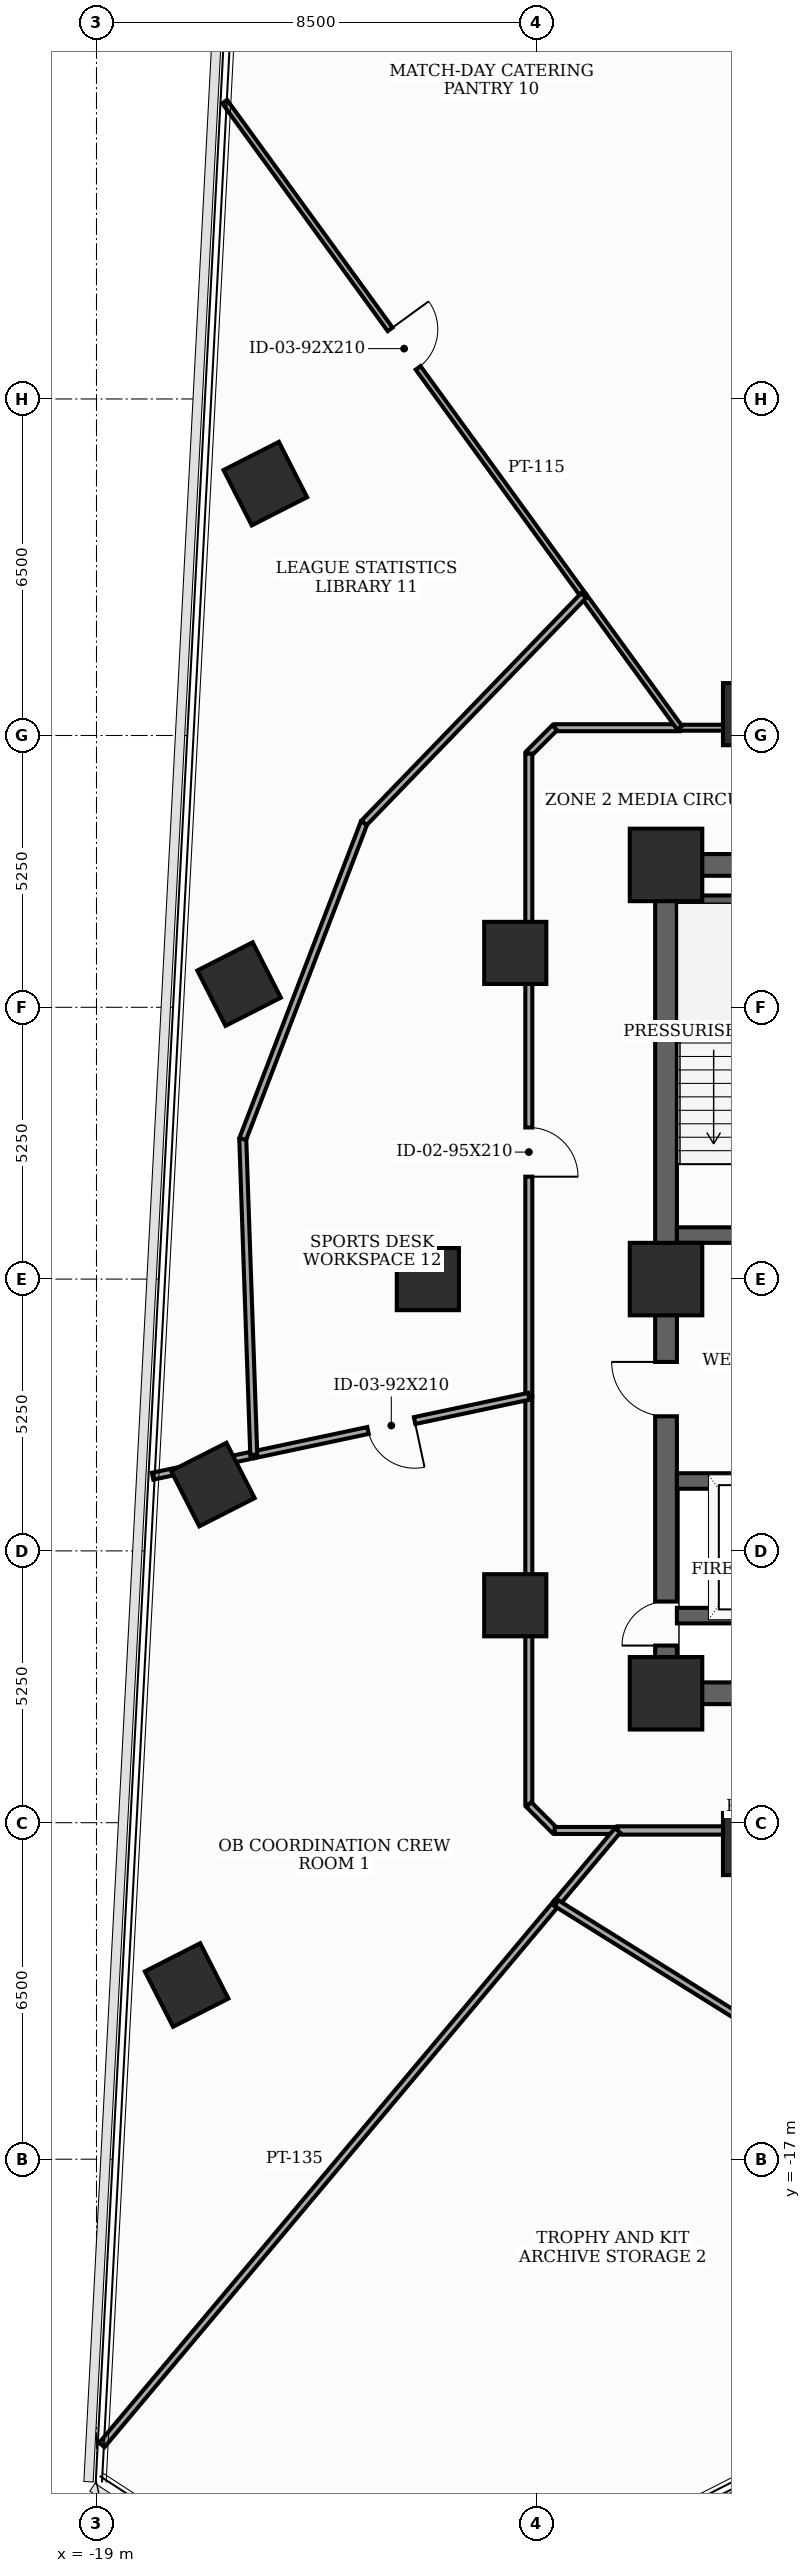
"""IFC4 building model, lengths in metres.
Left out: names, types, materials, properties, quantities, classifications, styles, units other than length and angle.
Written with IfcOpenShell. Run it as: python <this file> out.ifc"""

import sys

from ifc_helpers import new_model, si_unit, direction, frame, frame_2d, origin, origin_2d, place, context, subcontext, project, spatial, rectangle, extrude, element, fill, save


model = new_model("IFC4")
c1 = context("Model", 3, precision=1e-05, world=origin(), true_north=direction((0.0, 1.0)))
c2 = subcontext(c1, "Body", "Model", "MODEL_VIEW")
j1 = project(units=[si_unit("LENGTHUNIT", "METRE"), si_unit("PLANEANGLEUNIT", "RADIAN")], contexts=[c1])
p1 = place(None, origin())
s1 = spatial("IfcSite", under=j1, at=p1, CompositionType="ELEMENT")
p2 = place(p1, origin())
s2 = spatial("IfcBuilding", under=s1, at=p2, CompositionType="ELEMENT")
p3 = place(p2, frame((0.0, 0.0, 119.9)))
s3 = spatial("IfcBuildingStorey", under=s2, at=p3, CompositionType="ELEMENT", Elevation=119.9)
for number, where, z_axis, x_axis in (
    (1, (-8.0, -8.0, 0.0), (0.0, 0.0, 1.0), (1.0, 0.0, 0.0)),
    (2, (-8.0, 8.0, 0.0), (0.0, 0.0, 1.0), (1.0, 0.0, 0.0)),
    (3, (-8.0, 0.0, 0.0), (0.0, 0.0, 1.0), (1.0, 0.0, 0.0)),
):
    element("IfcColumn", number, at=place(p3, frame(where, z_axis=z_axis, x_axis=x_axis)), inside=s3, PredefinedType="COLUMN", context=c2, shape_type="SweptSolid", body=[
        extrude(rectangle(XDim=1.4, YDim=1.4, at=origin_2d()), origin(), (0.0, 0.0, 1.0), 3.7),
    ])
for number, where, z_axis, x_axis in (
    (4, (-6.3, 10.912, 0.0), (0.0, 0.0, 1.0), (1.0, 0.0, 0.0)),
    (5, (-10.912, 6.3, 0.0), (0.0, 0.0, 1.0), (1.0, 0.0, 0.0)),
    (6, (-12.6, 0.0, 0.0), (0.0, 0.0, 1.0), (1.0, 0.0, 0.0)),
    (7, (-10.912, -6.3, 0.0), (0.0, 0.0, 1.0), (1.0, 0.0, 0.0)),
    (8, (-6.3, -10.912, 0.0), (0.0, 0.0, 1.0), (1.0, 0.0, 0.0)),
    (9, (-15.739, 15.365, 0.0), (0.0, 0.0, 1.0), (0.891, 0.454, 0.0)),
    (10, (-16.246, 5.698, 0.0), (0.0, 0.0, 1.0), (0.891, 0.454, 0.0)),
    (11, (-16.752, -3.969, 0.0), (0.0, 0.0, 1.0), (0.891, 0.454, 0.0)),
    (12, (-17.259, -13.635, 0.0), (0.0, 0.0, 1.0), (0.891, 0.454, 0.0)),
):
    element("IfcColumn", number, at=place(p3, frame(where, z_axis=z_axis, x_axis=x_axis)), inside=s3, PredefinedType="COLUMN", context=c2, shape_type="SweptSolid", body=[
        extrude(rectangle(XDim=1.2, YDim=1.2, at=origin_2d()), origin(), (0.0, 0.0, 1.0), 3.7),
    ])
p4 = place(p3, frame((-8.0, -8.0, 0.0), z_axis=(0.0, 0.0, 1.0), x_axis=(0.0, 1.0, 0.0)))
e13 = element("IfcWall", 13, at=p4, inside=s3, PredefinedType="SHEAR", context=c2, shape_type="SweptSolid", body=[
    extrude(rectangle(XDim=16.0, YDim=0.42, at=frame_2d((8.0, 0.0))), origin(), (0.0, 0.0, 1.0), 3.5),
])
p5 = place(p4, frame((0.922, 0.0, 0.0)))
e14 = element("IfcOpeningElement", 14, at=p5, cuts=e13, PredefinedType="OPENING", context=c2, shape_type="SweptSolid", body=[
    extrude(rectangle(XDim=0.85, YDim=2.02, at=frame_2d((0.425, 1.01))), frame((0.0, 0.22, 0.0), z_axis=(0.0, -1.0, 0.0), x_axis=(1.0, 0.0, 0.0)), (0.0, 0.0, 1.0), 0.44),
])
p6 = place(p4, frame((5.35, 0.0, 0.0)))
e15 = element("IfcOpeningElement", 15, at=p6, cuts=e13, PredefinedType="OPENING", context=c2, shape_type="SweptSolid", body=[
    extrude(rectangle(XDim=1.05, YDim=2.15, at=frame_2d((0.525, 1.075))), frame((0.0, 0.22, 0.0), z_axis=(0.0, -1.0, 0.0), x_axis=(1.0, 0.0, 0.0)), (0.0, 0.0, 1.0), 0.44),
])
p7 = place(p3, frame((-8.0, -8.0, 0.0), z_axis=(0.0, 0.0, 1.0), x_axis=(1.0, 0.0, 0.0)))
e16 = element("IfcWall", 16, at=p7, inside=s3, PredefinedType="SHEAR", context=c2, shape_type="SweptSolid", body=[
    extrude(rectangle(XDim=16.0, YDim=0.42, at=frame_2d((8.0, 0.0))), origin(), (0.0, 0.0, 1.0), 3.5),
])
p8 = place(p7, frame((7.52, 0.0, 0.0)))
e17 = element("IfcOpeningElement", 17, at=p8, cuts=e16, PredefinedType="OPENING", context=c2, shape_type="SweptSolid", body=[
    extrude(rectangle(XDim=0.95, YDim=2.1, at=frame_2d((0.475, 1.05))), frame((0.0, 0.22, 0.0), z_axis=(0.0, -1.0, 0.0), x_axis=(1.0, 0.0, 0.0)), (0.0, 0.0, 1.0), 0.44),
])
p9 = place(p3, frame((-8.0, 8.0, 0.0), z_axis=(0.0, 0.0, 1.0), x_axis=(1.0, 0.0, 0.0)))
e18 = element("IfcWall", 18, at=p9, inside=s3, PredefinedType="SHEAR", context=c2, shape_type="SweptSolid", body=[
    extrude(rectangle(XDim=16.0, YDim=0.42, at=frame_2d((8.0, 0.0))), origin(), (0.0, 0.0, 1.0), 3.5),
])
p10 = place(p9, frame((7.1, 0.0, 0.0)))
e19 = element("IfcOpeningElement", 19, at=p10, cuts=e18, PredefinedType="OPENING", context=c2, shape_type="SweptSolid", body=[
    extrude(rectangle(XDim=1.8, YDim=2.15, at=frame_2d((0.9, 1.075))), frame((0.0, 0.22, 0.0), z_axis=(0.0, -1.0, 0.0), x_axis=(1.0, 0.0, 0.0)), (0.0, 0.0, 1.0), 0.44),
])
p11 = place(p3, frame((-7.79, 0.85, 0.0), z_axis=(0.0, 0.0, 1.0), x_axis=(1.0, 0.0, 0.0)))
e20 = element("IfcWall", 20, at=p11, inside=s3, PredefinedType="SHEAR", context=c2, shape_type="SweptSolid", body=[
    extrude(rectangle(XDim=3.34, YDim=0.3, at=frame_2d((1.67, 0.0))), origin(), (0.0, 0.0, 1.0), 3.5),
])
p12 = place(p11, frame((1.85, 0.0, 0.0)))
e21 = element("IfcOpeningElement", 21, at=p12, cuts=e20, PredefinedType="OPENING", context=c2, shape_type="SweptSolid", body=[
    extrude(rectangle(XDim=1.05, YDim=2.15, at=frame_2d((0.525, 1.075))), frame((0.0, 0.16, 0.0), z_axis=(0.0, -1.0, 0.0), x_axis=(1.0, 0.0, 0.0)), (0.0, 0.0, 1.0), 0.32),
])
p13 = place(p3, frame((-7.79, 7.26, 0.0), z_axis=(0.0, 0.0, 1.0), x_axis=(1.0, 0.0, 0.0)))
e22 = element("IfcWall", 22, at=p13, inside=s3, PredefinedType="SHEAR", context=c2, shape_type="SweptSolid", body=[
    extrude(rectangle(XDim=3.34, YDim=0.3, at=frame_2d((1.67, 0.0))), origin(), (0.0, 0.0, 1.0), 3.5),
])
p14 = place(p3, frame((-7.79, -3.9, 0.0), z_axis=(0.0, 0.0, 1.0), x_axis=(1.0, 0.0, 0.0)))
e23 = element("IfcWall", 23, at=p14, inside=s3, PredefinedType="SHEAR", context=c2, shape_type="SweptSolid", body=[
    extrude(rectangle(XDim=3.34, YDim=0.3, at=frame_2d((1.67, 0.0))), origin(), (0.0, 0.0, 1.0), 3.5),
])
p15 = place(p14, frame((1.27, 0.0, 0.0)))
e24 = element("IfcOpeningElement", 24, at=p15, cuts=e23, PredefinedType="OPENING", context=c2, shape_type="SweptSolid", body=[
    extrude(rectangle(XDim=1.1, YDim=2.1, at=frame_2d((0.55, 1.05))), frame((0.0, 0.16, 0.0), z_axis=(0.0, -1.0, 0.0), x_axis=(1.0, 0.0, 0.0)), (0.0, 0.0, 1.0), 0.32),
])
p16 = place(p3, frame((-7.79, -6.5, 0.0), z_axis=(0.0, 0.0, 1.0), x_axis=(1.0, 0.0, 0.0)))
e25 = element("IfcWall", 25, at=p16, inside=s3, PredefinedType="SHEAR", context=c2, shape_type="SweptSolid", body=[
    extrude(rectangle(XDim=3.34, YDim=0.3, at=frame_2d((1.67, 0.0))), origin(), (0.0, 0.0, 1.0), 3.5),
])
p17 = place(p3, frame((-10.65, -2.264, 0.0), z_axis=(0.0, 0.0, 1.0), x_axis=(0.0, -1.0, 0.0)))
e26 = element("IfcWall", 26, at=p17, inside=s3, PredefinedType="PARTITIONING", context=c2, shape_type="SweptSolid", body=[
    extrude(rectangle(XDim=7.886, YDim=0.135, at=frame_2d((3.943, 0.0))), origin(), (0.0, 0.0, 1.0), 2.785),
])
p18 = place(p3, frame((-10.65, -10.15, 0.0), z_axis=(0.0, 0.0, 1.0), x_axis=(0.707106781187, -0.707106781187, 0.0)))
e27 = element("IfcWall", 27, at=p18, inside=s3, PredefinedType="PARTITIONING", context=c2, shape_type="SweptSolid", body=[
    extrude(rectangle(XDim=0.707, YDim=0.135, at=frame_2d((0.354, 0.0))), origin(), (0.0, 0.0, 1.0), 3.5),
])
p19 = place(p3, frame((-10.15, -10.65, 0.0), z_axis=(0.0, 0.0, 1.0), x_axis=(1.0, 0.0, 0.0)))
e28 = element("IfcWall", 28, at=p19, inside=s3, PredefinedType="PARTITIONING", context=c2, shape_type="SweptSolid", body=[
    extrude(rectangle(XDim=1.214, YDim=0.135, at=frame_2d((0.607, 0.0))), origin(), (0.0, 0.0, 1.0), 3.5),
])
p20 = place(p3, frame((-8.936, -10.65, 0.0), z_axis=(0.0, 0.0, 1.0), x_axis=(1.0, 0.0, 0.0)))
e29 = element("IfcWall", 29, at=p20, inside=s3, PredefinedType="PARTITIONING", context=c2, shape_type="SweptSolid", body=[
    extrude(rectangle(XDim=11.591, YDim=0.16, at=frame_2d((5.795, 0.0))), origin(), (0.0, 0.0, 1.0), 2.785),
])
p21 = place(p20, frame((5.295, 0.0, 0.0)))
e30 = element("IfcOpeningElement", 30, at=p21, cuts=e29, PredefinedType="OPENING", context=c2, shape_type="SweptSolid", body=[
    extrude(rectangle(XDim=1.0, YDim=2.15, at=frame_2d((0.5, 1.075))), frame((0.0, 0.09, 0.0), z_axis=(0.0, -1.0, 0.0), x_axis=(1.0, 0.0, 0.0)), (0.0, 0.0, 1.0), 0.18),
])
p22 = place(p3, frame((-2.264, 10.65, 0.0), z_axis=(0.0, 0.0, 1.0), x_axis=(-1.0, 0.0, 0.0)))
e31 = element("IfcWall", 31, at=p22, inside=s3, PredefinedType="PARTITIONING", context=c2, shape_type="SweptSolid", body=[
    extrude(rectangle(XDim=5.474, YDim=0.115, at=frame_2d((2.737, 0.0))), origin(), (0.0, 0.0, 1.0), 2.785),
])
p23 = place(p22, frame((0.62, 0.0, 0.0)))
e32 = element("IfcOpeningElement", 32, at=p23, cuts=e31, PredefinedType="OPENING", context=c2, shape_type="SweptSolid", body=[
    extrude(rectangle(XDim=0.95, YDim=2.1, at=frame_2d((0.475, 1.05))), frame((0.0, 0.067, 0.0), z_axis=(0.0, -1.0, 0.0), x_axis=(1.0, 0.0, 0.0)), (0.0, 0.0, 1.0), 0.135),
])
p24 = place(p3, frame((-7.738, 10.65, 0.0), z_axis=(0.0, 0.0, 1.0), x_axis=(-1.0, 0.0, 0.0)))
e33 = element("IfcWall", 33, at=p24, inside=s3, PredefinedType="PARTITIONING", context=c2, shape_type="SweptSolid", body=[
    extrude(rectangle(XDim=2.412, YDim=0.135, at=frame_2d((1.206, 0.0))), origin(), (0.0, 0.0, 1.0), 3.5),
])
p25 = place(p3, frame((-10.15, 10.65, 0.0), z_axis=(0.0, 0.0, 1.0), x_axis=(-0.707106781187, -0.707106781187, 0.0)))
e34 = element("IfcWall", 34, at=p25, inside=s3, PredefinedType="PARTITIONING", context=c2, shape_type="SweptSolid", body=[
    extrude(rectangle(XDim=0.707, YDim=0.135, at=frame_2d((0.354, 0.0))), origin(), (0.0, 0.0, 1.0), 3.5),
])
p26 = place(p3, frame((-10.65, 10.15, 0.0), z_axis=(0.0, 0.0, 1.0), x_axis=(0.0, -1.0, 0.0)))
e35 = element("IfcWall", 35, at=p26, inside=s3, PredefinedType="PARTITIONING", context=c2, shape_type="SweptSolid", body=[
    extrude(rectangle(XDim=12.414, YDim=0.135, at=frame_2d((6.207, 0.0))), origin(), (0.0, 0.0, 1.0), 2.785),
])
p27 = place(p26, frame((7.222, 0.0, 0.0)))
e36 = element("IfcOpeningElement", 36, at=p27, cuts=e35, PredefinedType="OPENING", context=c2, shape_type="SweptSolid", body=[
    extrude(rectangle(XDim=0.95, YDim=2.1, at=frame_2d((0.475, 1.05))), frame((0.0, 0.077, 0.0), z_axis=(0.0, -1.0, 0.0), x_axis=(1.0, 0.0, 0.0)), (0.0, 0.0, 1.0), 0.155),
])
p28 = place(p3, frame((-18.896, -22.52, 0.0), z_axis=(0.0, 0.0, 1.0), x_axis=(0.642815636807, 0.766020924698, 0.0)))
e37 = element("IfcWall", 37, at=p28, inside=s3, PredefinedType="PARTITIONING", context=c2, shape_type="SweptSolid", body=[
    extrude(rectangle(XDim=13.661, YDim=0.135, at=frame_2d((6.831, 0.0))), origin(), (0.0, 0.0, 1.0), 2.985),
])
p29 = place(p3, frame((-10.115, -12.055, 0.0), z_axis=(0.0, 0.0, 1.0), x_axis=(0.64278617419, 0.766045647642, 0.0)))
e38 = element("IfcWall", 38, at=p29, inside=s3, PredefinedType="PARTITIONING", context=c2, shape_type="SweptSolid", body=[
    extrude(rectangle(XDim=1.834, YDim=0.135, at=frame_2d((0.917, 0.0))), origin(), (0.0, 0.0, 1.0), 3.5),
])
p30 = place(p3, frame((-15.962, -3.393, 0.0), z_axis=(0.0, 0.0, 1.0), x_axis=(-0.978224349737, -0.207550286874, 0.0)))
e39 = element("IfcWall", 39, at=p30, inside=s3, PredefinedType="PARTITIONING", context=c2, shape_type="SweptSolid", body=[
    extrude(rectangle(XDim=1.997, YDim=0.135, at=frame_2d((0.999, 0.0))), origin(), (0.0, 0.0, 1.0), 2.885),
])
p31 = place(p3, frame((-10.65, -2.264, 0.0), z_axis=(0.0, 0.0, 1.0), x_axis=(-0.978145824013, -0.207920049456, 0.0)))
e40 = element("IfcWall", 40, at=p31, inside=s3, PredefinedType="PARTITIONING", context=c2, shape_type="SweptSolid", body=[
    extrude(rectangle(XDim=5.431, YDim=0.135, at=frame_2d((2.715, 0.0))), origin(), (0.0, 0.0, 1.0), 2.785),
])
p32 = place(p31, frame((2.255, 0.0, 0.0)))
e41 = element("IfcOpeningElement", 41, at=p32, cuts=e40, PredefinedType="OPENING", context=c2, shape_type="SweptSolid", body=[
    extrude(rectangle(XDim=0.92, YDim=2.1, at=frame_2d((0.46, 1.05))), frame((0.0, 0.077, 0.0), z_axis=(0.0, -1.0, 0.0), x_axis=(1.0, 0.0, 0.0)), (0.0, 0.0, 1.0), 0.155),
])
p33 = place(p3, frame((-6.046, -14.597, 0.0), z_axis=(0.0, 0.0, 1.0), x_axis=(-0.848109776096, 0.529820542912, 0.0)))
e42 = element("IfcWall", 42, at=p33, inside=s3, PredefinedType="PARTITIONING", context=c2, shape_type="SweptSolid", body=[
    extrude(rectangle(XDim=4.798, YDim=0.135, at=frame_2d((2.399, 0.0))), origin(), (0.0, 0.0, 1.0), 3.5),
])
p34 = place(p3, frame((-16.524, 22.743, 0.0), z_axis=(0.0, 0.0, 1.0), x_axis=(0.587785136625, -0.809017078412, 0.0)))
e43 = element("IfcWall", 43, at=p34, inside=s3, PredefinedType="PARTITIONING", context=c2, shape_type="SweptSolid", body=[
    extrude(rectangle(XDim=11.794, YDim=0.115, at=frame_2d((5.897, 0.0))), origin(), (0.0, 0.0, 1.0), 2.985),
])
p35 = place(p34, frame((5.437, 0.0, 0.0)))
e44 = element("IfcOpeningElement", 44, at=p35, cuts=e43, PredefinedType="OPENING", context=c2, shape_type="SweptSolid", body=[
    extrude(rectangle(XDim=0.92, YDim=2.1, at=frame_2d((0.46, 1.05))), frame((0.0, 0.067, 0.0), z_axis=(0.0, -1.0, 0.0), x_axis=(1.0, 0.0, 0.0)), (0.0, 0.0, 1.0), 0.135),
])
p36 = place(p3, frame((-9.592, 13.202, 0.0), z_axis=(0.0, 0.0, 1.0), x_axis=(0.587757438745, -0.80903720137, 0.0)))
e45 = element("IfcWall", 45, at=p36, inside=s3, PredefinedType="PARTITIONING", context=c2, shape_type="SweptSolid", body=[
    extrude(rectangle(XDim=3.154, YDim=0.115, at=frame_2d((1.577, 0.0))), origin(), (0.0, 0.0, 1.0), 3.5),
])
p37 = place(p3, frame((-15.962, -3.393, 0.0), z_axis=(0.0, 0.0, 1.0), x_axis=(-0.034918259019, 0.999390171648, 0.0)))
e46 = element("IfcWall", 46, at=p37, inside=s3, PredefinedType="PARTITIONING", context=c2, shape_type="SweptSolid", body=[
    extrude(rectangle(XDim=6.104, YDim=0.135, at=frame_2d((3.052, 0.0))), origin(), (0.0, 0.0, 1.0), 2.885),
])
p38 = place(p3, frame((-16.175, 2.707, 0.0), z_axis=(0.0, 0.0, 1.0), x_axis=(0.358305989998, 0.93360420818, 0.0)))
e47 = element("IfcWall", 47, at=p38, inside=s3, PredefinedType="PARTITIONING", context=c2, shape_type="SweptSolid", body=[
    extrude(rectangle(XDim=6.539, YDim=0.135, at=frame_2d((3.27, 0.0))), origin(), (0.0, 0.0, 1.0), 2.885),
])
p39 = place(p3, frame((-13.832, 8.812, 0.0), z_axis=(0.0, 0.0, 1.0), x_axis=(0.694719433394, 0.719280827538, 0.0)))
e48 = element("IfcWall", 48, at=p39, inside=s3, PredefinedType="PARTITIONING", context=c2, shape_type="SweptSolid", body=[
    extrude(rectangle(XDim=6.103, YDim=0.135, at=frame_2d((3.052, 0.0))), origin(), (0.0, 0.0, 1.0), 2.885),
])
p40 = place(p5, origin())
e49 = element("IfcDoor", 49, at=p40, inside=s3, OperationType="SINGLE_SWING_LEFT", PredefinedType="TRAPDOOR", context=c2, shape_type="SweptSolid", body=[
    extrude(rectangle(XDim=0.85, YDim=2.02, at=frame_2d((0.425, 1.01))), frame((0.0, 0.025, 0.0), z_axis=(0.0, -1.0, 0.0), x_axis=(1.0, 0.0, 0.0)), (0.0, 0.0, 1.0), 0.05),
])
fill(e14, e49)
p41 = place(p6, origin())
e50 = element("IfcDoor", 50, at=p41, inside=s3, OperationType="SINGLE_SWING_RIGHT", PredefinedType="DOOR", context=c2, shape_type="SweptSolid", body=[
    extrude(rectangle(XDim=1.05, YDim=2.15, at=frame_2d((0.525, 1.075))), frame((0.0, 0.025, 0.0), z_axis=(0.0, -1.0, 0.0), x_axis=(1.0, 0.0, 0.0)), (0.0, 0.0, 1.0), 0.05),
])
fill(e15, e50)
p42 = place(p27, origin())
e51 = element("IfcDoor", 51, at=p42, inside=s3, OperationType="SINGLE_SWING_RIGHT", PredefinedType="DOOR", context=c2, shape_type="SweptSolid", body=[
    extrude(rectangle(XDim=0.95, YDim=2.1, at=frame_2d((0.475, 1.05))), frame((0.0, 0.025, 0.0), z_axis=(0.0, -1.0, 0.0), x_axis=(1.0, 0.0, 0.0)), (0.0, 0.0, 1.0), 0.05),
])
fill(e36, e51)
p43 = place(p32, origin())
e52 = element("IfcDoor", 52, at=p43, inside=s3, OperationType="SINGLE_SWING_LEFT", PredefinedType="DOOR", context=c2, shape_type="SweptSolid", body=[
    extrude(rectangle(XDim=0.92, YDim=2.1, at=frame_2d((0.46, 1.05))), frame((0.0, 0.025, 0.0), z_axis=(0.0, -1.0, 0.0), x_axis=(1.0, 0.0, 0.0)), (0.0, 0.0, 1.0), 0.05),
])
fill(e41, e52)
p44 = place(p35, origin())
e53 = element("IfcDoor", 53, at=p44, inside=s3, OperationType="SINGLE_SWING_LEFT", PredefinedType="DOOR", context=c2, shape_type="SweptSolid", body=[
    extrude(rectangle(XDim=0.92, YDim=2.1, at=frame_2d((0.46, 1.05))), frame((0.0, 0.025, 0.0), z_axis=(0.0, -1.0, 0.0), x_axis=(1.0, 0.0, 0.0)), (0.0, 0.0, 1.0), 0.05),
])
fill(e44, e53)
save(model, sys.argv[1])
